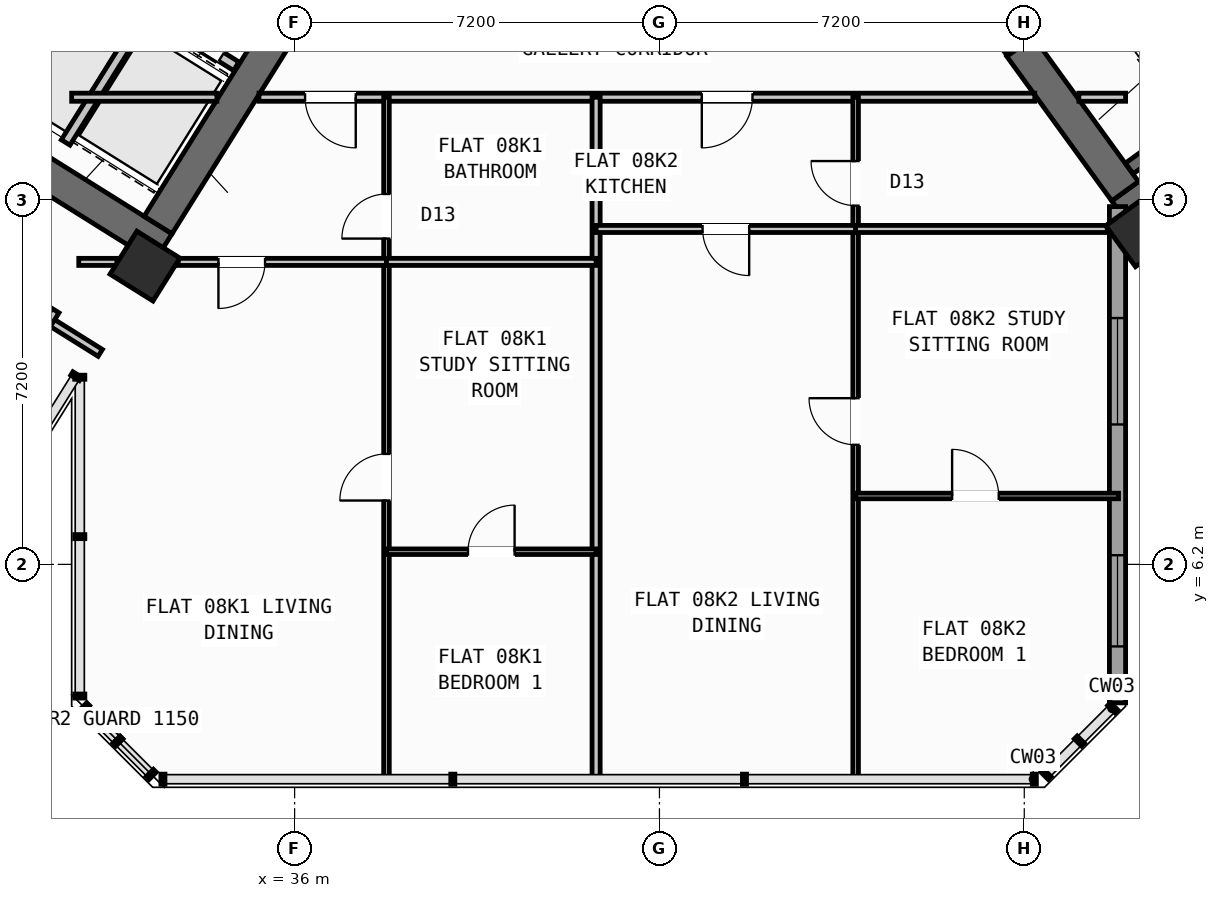
"""IFC4 building model, lengths in metres.
Left out: names, types, materials, properties, quantities, classifications, styles, units other than length and angle.
Written with IfcOpenShell. Run it as: python <this file> out.ifc"""

import sys

from ifc_helpers import new_model, si_unit, direction, frame, frame_2d, origin, origin_2d, place, context, subcontext, project, spatial, rectangle, hollow_rectangle, extrude, source, transform, mapped, element, fill, save


model = new_model("IFC4")
c1 = context("Model", 3, precision=1e-05, world=origin(), true_north=direction((0.0, 1.0)))
c2 = subcontext(c1, "Body", "Model", "MODEL_VIEW")
j1 = project(units=[si_unit("LENGTHUNIT", "METRE"), si_unit("PLANEANGLEUNIT", "RADIAN")], contexts=[c1])
p1 = place(None, origin())
s1 = spatial("IfcSite", under=j1, at=p1, CompositionType="ELEMENT")
p2 = place(p1, origin())
s2 = spatial("IfcBuilding", under=s1, at=p2, CompositionType="ELEMENT")
p3 = place(p2, frame((0.0, 0.0, 34.8)))
s3 = spatial("IfcBuildingStorey", under=s2, at=p3, CompositionType="ELEMENT", Elevation=34.8)
p4 = place(p3, frame((33.409, 12.45, 0.0), z_axis=(0.0, 0.0, 1.0), x_axis=(-0.848051132073, 0.529914405721, 0.0)))
e1 = element("IfcWall", 1, at=p4, inside=s3, PredefinedType="SHEAR", context=c2, shape_type="SweptSolid", body=[
    extrude(rectangle(XDim=13.24, YDim=0.65, at=frame_2d((6.62, 0.0))), origin(), (0.0, 0.0, 1.0), 3.35),
])
p5 = place(p3, frame((36.683, 18.304, 0.0), z_axis=(0.0, 0.0, 1.0), x_axis=(-0.529899109053, -0.848060690178, 0.0)))
e2 = element("IfcWall", 2, at=p5, inside=s3, PredefinedType="SHEAR", context=c2, shape_type="SweptSolid", body=[
    extrude(rectangle(XDim=6.375, YDim=0.65, at=frame_2d((3.188, 0.0))), origin(), (0.0, 0.0, 1.0), 3.35),
])
p6 = place(p3, frame((52.318, 13.11, 0.0), z_axis=(0.0, 0.0, 1.0), x_axis=(0.809019445368, 0.587781878776, 0.0)))
e3 = element("IfcWall", 3, at=p6, inside=s3, PredefinedType="SHEAR", context=c2, shape_type="SweptSolid", body=[
    extrude(rectangle(XDim=12.44, YDim=0.65, at=frame_2d((6.22, 0.0))), origin(), (0.0, 0.0, 1.0), 3.35),
])
p7 = place(p3, frame((52.39, 13.564, 0.0), z_axis=(0.0, 0.0, 1.0), x_axis=(-0.58779688989, 0.809008539037, 0.0)))
e4 = element("IfcWall", 4, at=p7, inside=s3, PredefinedType="SHEAR", context=c2, shape_type="SweptSolid", body=[
    extrude(rectangle(XDim=3.525, YDim=0.65, at=frame_2d((1.763, 0.0))), origin(), (0.0, 0.0, 1.0), 3.35),
])
m1 = source(origin(), c2, "Body", "SweptSolid", [
    extrude(hollow_rectangle(XDim=1.0, YDim=1.0, WallThickness=0.04, at=origin_2d()), origin(), (0.0, 0.0, 1.0), 3.6),
])
for number, where, z_axis, x_axis in (
    (5, (33.046, 12.087, 0.0), (0.0, 0.0, 1.0), (-0.848, 0.53, 0.0)),
    (6, (52.705, 12.773, 0.0), (0.0, 0.0, 1.0), (0.809, 0.588, 0.0)),
):
    element("IfcColumn", number, at=place(p3, frame(where, z_axis=z_axis, x_axis=x_axis)), inside=s3, PredefinedType="COLUMN", context=c2, shape_type="MappedRepresentation", body=[
        mapped(m1, transform((0.0, 0.0, 0.0), scale=1.0)),
    ])
p8 = place(p3, frame((56.581, 7.439, 0.0), z_axis=(0.0, 0.0, 1.0), x_axis=(-0.587785875463, 0.809016541614, 0.0)))
e7 = element("IfcWall", 7, at=p8, inside=s3, PredefinedType="STANDARD", context=c2, shape_type="SweptSolid", body=[
    extrude(rectangle(XDim=6.774, YDim=0.32, at=frame_2d((3.387, 0.0))), origin(), (0.0, 0.0, 1.0), 2.725),
])
p9 = place(p8, frame((1.556, 0.0, 0.8)))
e8 = element("IfcOpeningElement", 8, at=p9, cuts=e7, PredefinedType="OPENING", context=c2, shape_type="SweptSolid", body=[
    extrude(rectangle(XDim=2.1, YDim=1.55, at=frame_2d((1.05, 0.775))), frame((0.0, 0.17, 0.0), z_axis=(0.0, -1.0, 0.0), x_axis=(1.0, 0.0, 0.0)), (0.0, 0.0, 1.0), 0.34),
])
p10 = place(p3, frame((52.24, 13.261, 0.0), z_axis=(0.0, 0.0, 1.0), x_axis=(0.0, -1.0, 0.0)))
e9 = element("IfcWall", 9, at=p10, inside=s3, PredefinedType="STANDARD", context=c2, shape_type="SweptSolid", body=[
    extrude(rectangle(XDim=9.795, YDim=0.32, at=frame_2d((4.897, 0.0))), origin(), (0.0, 0.0, 1.0), 3.35),
])
p11 = place(p10, frame((2.199, 0.0, 0.8)))
e10 = element("IfcOpeningElement", 10, at=p11, cuts=e9, PredefinedType="OPENING", context=c2, shape_type="SweptSolid", body=[
    extrude(rectangle(XDim=2.1, YDim=1.55, at=frame_2d((1.05, 0.775))), frame((0.0, 0.17, 0.0), z_axis=(0.0, -1.0, 0.0), x_axis=(1.0, 0.0, 0.0)), (0.0, 0.0, 1.0), 0.34),
])
p12 = place(p10, frame((6.88, 0.0, 0.85)))
e11 = element("IfcOpeningElement", 11, at=p12, cuts=e9, PredefinedType="OPENING", context=c2, shape_type="SweptSolid", body=[
    extrude(rectangle(XDim=1.8, YDim=1.5, at=frame_2d((0.9, 0.75))), frame((0.0, 0.17, 0.0), z_axis=(0.0, -1.0, 0.0), x_axis=(1.0, 0.0, 0.0)), (0.0, 0.0, 1.0), 0.34),
])
p13 = place(p3, frame((31.288, 18.256, 0.0), z_axis=(0.0, 0.0, 1.0), x_axis=(-0.529943379326, -0.848033026897, 0.0)))
e12 = element("IfcWall", 12, at=p13, inside=s3, PredefinedType="SHEAR", context=c2, shape_type="SweptSolid", body=[
    extrude(rectangle(XDim=3.16, YDim=0.26, at=frame_2d((1.58, 0.0))), origin(), (0.0, 0.0, 1.0), 3.35),
])
p14 = place(p3, frame((34.848, 16.031, 0.0), z_axis=(0.0, 0.0, 1.0), x_axis=(-0.848044042236, 0.529925751807, 0.0)))
e13 = element("IfcWall", 13, at=p14, inside=s3, PredefinedType="STANDARD", context=c2, shape_type="SweptSolid", body=[
    extrude(rectangle(XDim=4.198, YDim=0.2, at=frame_2d((2.099, 0.0))), origin(), (0.0, 0.0, 1.0), 3.34),
])
p15 = place(p14, frame((0.348, 0.0, 0.0)))
e14 = element("IfcOpeningElement", 14, at=p15, cuts=e13, PredefinedType="OPENING", context=c2, shape_type="SweptSolid", body=[
    extrude(rectangle(XDim=1.3, YDim=2.2, at=frame_2d((0.65, 1.1))), frame((0.0, 0.11, 0.0), z_axis=(0.0, -1.0, 0.0), x_axis=(1.0, 0.0, 0.0)), (0.0, 0.0, 1.0), 0.22),
])
p16 = place(p14, frame((2.423, 0.0, 0.0)))
e15 = element("IfcOpeningElement", 15, at=p16, cuts=e13, PredefinedType="OPENING", context=c2, shape_type="SweptSolid", body=[
    extrude(rectangle(XDim=1.45, YDim=2.25, at=frame_2d((0.725, 1.125))), frame((0.0, 0.11, 0.0), z_axis=(0.0, -1.0, 0.0), x_axis=(1.0, 0.0, 0.0)), (0.0, 0.0, 1.0), 0.22),
])
p17 = place(p3, frame((33.029, 17.003, 0.0), z_axis=(0.0, 0.0, 1.0), x_axis=(-0.529916267533, -0.848049968695, 0.0)))
e16 = element("IfcWall", 16, at=p17, inside=s3, PredefinedType="STANDARD", context=c2, shape_type="SweptSolid", body=[
    extrude(rectangle(XDim=2.92, YDim=0.2, at=frame_2d((1.46, 0.0))), origin(), (0.0, 0.0, 1.0), 3.34),
])
p18 = place(p3, frame((52.472, 14.013, 0.0), z_axis=(0.0, 0.0, 1.0), x_axis=(0.809028366311, 0.587769599847, 0.0)))
e17 = element("IfcWall", 17, at=p18, inside=s3, PredefinedType="SHEAR", context=c2, shape_type="SweptSolid", body=[
    extrude(rectangle(XDim=7.33, YDim=0.26, at=frame_2d((3.665, 0.0))), origin(), (0.0, 0.0, 1.0), 3.35),
])
p19 = place(p3, frame((32.164, 10.374, 0.0), z_axis=(0.0, 0.0, 1.0), x_axis=(-0.848044107957, 0.529925646633, 0.0)))
e18 = element("IfcWall", 18, at=p19, inside=s3, PredefinedType="PARTITIONING", context=c2, shape_type="SweptSolid", body=[
    extrude(rectangle(XDim=15.57, YDim=0.16, at=frame_2d((7.785, 0.0))), origin(), (0.0, 0.0, 1.0), 3.34),
])
p20 = place(p19, frame((10.83, 0.0, 0.0)))
e19 = element("IfcOpeningElement", 19, at=p20, cuts=e18, PredefinedType="OPENING", context=c2, shape_type="SweptSolid", body=[
    extrude(rectangle(XDim=1.0, YDim=2.1, at=frame_2d((0.5, 1.05))), frame((0.0, 0.09, 0.0), z_axis=(0.0, -1.0, 0.0), x_axis=(1.0, 0.0, 0.0)), (0.0, 0.0, 1.0), 0.18),
])
p21 = place(p3, frame((31.282, 11.208, 0.0), z_axis=(0.0, 0.0, 1.0), x_axis=(-0.529938869374, -0.84803584519, 0.0)))
e20 = element("IfcWall", 20, at=p21, inside=s3, PredefinedType="PARTITIONING", context=c2, shape_type="SweptSolid", body=[
    extrude(rectangle(XDim=5.48, YDim=0.16, at=frame_2d((2.74, 0.0))), origin(), (0.0, 0.0, 1.0), 3.34),
])
p22 = place(p3, frame((31.6, 15.42, 0.0), z_axis=(0.0, 0.0, 1.0), x_axis=(1.0, 0.0, 0.0)))
e21 = element("IfcWall", 21, at=p22, inside=s3, PredefinedType="PARTITIONING", context=c2, shape_type="SweptSolid", body=[
    extrude(rectangle(XDim=2.866, YDim=0.16, at=frame_2d((1.433, 0.0))), origin(), (0.0, 0.0, 1.0), 3.34),
])
p23 = place(p3, frame((35.296, 15.42, 0.0), z_axis=(0.0, 0.0, 1.0), x_axis=(1.0, 0.0, 0.0)))
e22 = element("IfcWall", 22, at=p23, inside=s3, PredefinedType="PARTITIONING", context=c2, shape_type="SweptSolid", body=[
    extrude(rectangle(XDim=15.311, YDim=0.16, at=frame_2d((7.655, 0.0))), origin(), (0.0, 0.0, 1.0), 3.34),
])
p24 = place(p23, frame((0.91, 0.0, 0.0)))
e23 = element("IfcOpeningElement", 23, at=p24, cuts=e22, PredefinedType="OPENING", context=c2, shape_type="SweptSolid", body=[
    extrude(rectangle(XDim=1.0, YDim=2.1, at=frame_2d((0.5, 1.05))), frame((0.0, 0.09, 0.0), z_axis=(0.0, -1.0, 0.0), x_axis=(1.0, 0.0, 0.0)), (0.0, 0.0, 1.0), 0.18),
])
p25 = place(p23, frame((8.74, 0.0, 0.0)))
e24 = element("IfcOpeningElement", 24, at=p25, cuts=e22, PredefinedType="OPENING", context=c2, shape_type="SweptSolid", body=[
    extrude(rectangle(XDim=1.0, YDim=2.1, at=frame_2d((0.5, 1.05))), frame((0.0, 0.09, 0.0), z_axis=(0.0, -1.0, 0.0), x_axis=(1.0, 0.0, 0.0)), (0.0, 0.0, 1.0), 0.18),
])
p26 = place(p3, frame((51.477, 15.42, 0.0), z_axis=(0.0, 0.0, 1.0), x_axis=(1.0, 0.0, 0.0)))
e25 = element("IfcWall", 25, at=p26, inside=s3, PredefinedType="PARTITIONING", context=c2, shape_type="SweptSolid", body=[
    extrude(rectangle(XDim=0.923, YDim=0.16, at=frame_2d((0.461, 0.0))), origin(), (0.0, 0.0, 1.0), 3.34),
])
p27 = place(p3, frame((50.119, 16.333, 0.0), z_axis=(0.0, 0.0, 1.0), x_axis=(-0.587749856981, 0.809042709391, 0.0)))
e26 = element("IfcWall", 26, at=p27, inside=s3, PredefinedType="STANDARD", context=c2, shape_type="SweptSolid", body=[
    extrude(rectangle(XDim=2.96, YDim=0.2, at=frame_2d((1.48, 0.0))), origin(), (0.0, 0.0, 1.0), 3.34),
])
p28 = place(p27, frame((0.53, 0.0, 0.0)))
e27 = element("IfcOpeningElement", 27, at=p28, cuts=e26, PredefinedType="OPENING", context=c2, shape_type="SweptSolid", body=[
    extrude(rectangle(XDim=1.5, YDim=2.15, at=frame_2d((0.75, 1.075))), frame((0.0, 0.11, 0.0), z_axis=(0.0, -1.0, 0.0), x_axis=(1.0, 0.0, 0.0)), (0.0, 0.0, 1.0), 0.22),
])
p29 = place(p3, frame((41.95, 1.96, 0.0), z_axis=(0.0, 0.0, 1.0), x_axis=(0.0, 1.0, 0.0)))
e28 = element("IfcWall", 28, at=p29, inside=s3, PredefinedType="PARTITIONING", context=c2, shape_type="SweptSolid", body=[
    extrude(rectangle(XDim=13.46, YDim=0.16, at=frame_2d((6.73, 0.0))), origin(), (0.0, 0.0, 1.0), 3.34),
])
p30 = place(p3, frame((37.813, 1.96, 0.0), z_axis=(0.0, 0.0, 1.0), x_axis=(0.0, 1.0, 0.0)))
e29 = element("IfcWall", 29, at=p30, inside=s3, PredefinedType="PARTITIONING", context=c2, shape_type="SweptSolid", body=[
    extrude(rectangle(XDim=13.46, YDim=0.11, at=frame_2d((6.73, 0.0))), origin(), (0.0, 0.0, 1.0), 3.34),
])
p31 = place(p30, frame((5.5, 0.0, 0.0)))
e30 = element("IfcOpeningElement", 30, at=p31, cuts=e29, PredefinedType="OPENING", context=c2, shape_type="SweptSolid", body=[
    extrude(rectangle(XDim=0.92, YDim=2.08, at=frame_2d((0.46, 1.04))), frame((0.0, 0.065, 0.0), z_axis=(0.0, -1.0, 0.0), x_axis=(1.0, 0.0, 0.0)), (0.0, 0.0, 1.0), 0.13),
])
p32 = place(p30, frame((10.67, 0.0, 0.0)))
e31 = element("IfcOpeningElement", 31, at=p32, cuts=e29, PredefinedType="OPENING", context=c2, shape_type="SweptSolid", body=[
    extrude(rectangle(XDim=0.88, YDim=2.08, at=frame_2d((0.44, 1.04))), frame((0.0, 0.065, 0.0), z_axis=(0.0, -1.0, 0.0), x_axis=(1.0, 0.0, 0.0)), (0.0, 0.0, 1.0), 0.13),
])
p33 = place(p3, frame((31.74, 12.17, 0.0), z_axis=(0.0, 0.0, 1.0), x_axis=(1.0, 0.0, 0.0)))
e32 = element("IfcWall", 32, at=p33, inside=s3, PredefinedType="PLUMBINGWALL", context=c2, shape_type="SweptSolid", body=[
    extrude(rectangle(XDim=0.754, YDim=0.14, at=frame_2d((0.377, 0.0))), origin(), (0.0, 0.0, 1.0), 3.34),
])
p34 = place(p3, frame((33.702, 12.17, 0.0), z_axis=(0.0, 0.0, 1.0), x_axis=(1.0, 0.0, 0.0)))
e33 = element("IfcWall", 33, at=p34, inside=s3, PredefinedType="PLUMBINGWALL", context=c2, shape_type="SweptSolid", body=[
    extrude(rectangle(XDim=4.111, YDim=0.14, at=frame_2d((2.056, 0.0))), origin(), (0.0, 0.0, 1.0), 2.525),
])
p35 = place(p34, frame((0.795, 0.0, 0.0)))
e34 = element("IfcOpeningElement", 34, at=p35, cuts=e33, PredefinedType="OPENING", context=c2, shape_type="SweptSolid", body=[
    extrude(rectangle(XDim=0.92, YDim=2.08, at=frame_2d((0.46, 1.04))), frame((0.0, 0.08, 0.0), z_axis=(0.0, -1.0, 0.0), x_axis=(1.0, 0.0, 0.0)), (0.0, 0.0, 1.0), 0.16),
])
p36 = place(p3, frame((37.813, 12.17, 0.0), z_axis=(0.0, 0.0, 1.0), x_axis=(1.0, 0.0, 0.0)))
e35 = element("IfcWall", 35, at=p36, inside=s3, PredefinedType="PLUMBINGWALL", context=c2, shape_type="SweptSolid", body=[
    extrude(rectangle(XDim=4.137, YDim=0.14, at=frame_2d((2.068, 0.0))), origin(), (0.0, 0.0, 1.0), 2.525),
])
p37 = place(p3, frame((37.813, 6.45, 0.0), z_axis=(0.0, 0.0, 1.0), x_axis=(1.0, 0.0, 0.0)))
e36 = element("IfcWall", 36, at=p37, inside=s3, PredefinedType="PARTITIONING", context=c2, shape_type="SweptSolid", body=[
    extrude(rectangle(XDim=4.137, YDim=0.11, at=frame_2d((2.068, 0.0))), origin(), (0.0, 0.0, 1.0), 3.34),
])
p38 = place(p37, frame((1.608, 0.0, 0.0)))
e37 = element("IfcOpeningElement", 37, at=p38, cuts=e36, PredefinedType="OPENING", context=c2, shape_type="SweptSolid", body=[
    extrude(rectangle(XDim=0.92, YDim=2.08, at=frame_2d((0.46, 1.04))), frame((0.0, 0.065, 0.0), z_axis=(0.0, -1.0, 0.0), x_axis=(1.0, 0.0, 0.0)), (0.0, 0.0, 1.0), 0.13),
])
p39 = place(p3, frame((47.072, 1.96, 0.0), z_axis=(0.0, 0.0, 1.0), x_axis=(0.0, 1.0, 0.0)))
e38 = element("IfcWall", 38, at=p39, inside=s3, PredefinedType="PARTITIONING", context=c2, shape_type="SweptSolid", body=[
    extrude(rectangle(XDim=13.46, YDim=0.11, at=frame_2d((6.73, 0.0))), origin(), (0.0, 0.0, 1.0), 3.34),
])
p40 = place(p39, frame((6.6, 0.0, 0.0)))
e39 = element("IfcOpeningElement", 39, at=p40, cuts=e38, PredefinedType="OPENING", context=c2, shape_type="SweptSolid", body=[
    extrude(rectangle(XDim=0.92, YDim=2.08, at=frame_2d((0.46, 1.04))), frame((0.0, 0.065, 0.0), z_axis=(0.0, -1.0, 0.0), x_axis=(1.0, 0.0, 0.0)), (0.0, 0.0, 1.0), 0.13),
])
p41 = place(p39, frame((11.32, 0.0, 0.0)))
e40 = element("IfcOpeningElement", 40, at=p41, cuts=e38, PredefinedType="OPENING", context=c2, shape_type="SweptSolid", body=[
    extrude(rectangle(XDim=0.88, YDim=2.08, at=frame_2d((0.44, 1.04))), frame((0.0, 0.065, 0.0), z_axis=(0.0, -1.0, 0.0), x_axis=(1.0, 0.0, 0.0)), (0.0, 0.0, 1.0), 0.13),
])
p42 = place(p3, frame((41.95, 12.82, 0.0), z_axis=(0.0, 0.0, 1.0), x_axis=(1.0, 0.0, 0.0)))
e41 = element("IfcWall", 41, at=p42, inside=s3, PredefinedType="PLUMBINGWALL", context=c2, shape_type="SweptSolid", body=[
    extrude(rectangle(XDim=5.122, YDim=0.14, at=frame_2d((2.561, 0.0))), origin(), (0.0, 0.0, 1.0), 2.525),
])
p43 = place(p42, frame((2.101, 0.0, 0.0)))
e42 = element("IfcOpeningElement", 42, at=p43, cuts=e41, PredefinedType="OPENING", context=c2, shape_type="SweptSolid", body=[
    extrude(rectangle(XDim=0.92, YDim=2.08, at=frame_2d((0.46, 1.04))), frame((0.0, 0.08, 0.0), z_axis=(0.0, -1.0, 0.0), x_axis=(1.0, 0.0, 0.0)), (0.0, 0.0, 1.0), 0.16),
])
p44 = place(p3, frame((47.072, 12.82, 0.0), z_axis=(0.0, 0.0, 1.0), x_axis=(1.0, 0.0, 0.0)))
e43 = element("IfcWall", 43, at=p44, inside=s3, PredefinedType="PLUMBINGWALL", context=c2, shape_type="SweptSolid", body=[
    extrude(rectangle(XDim=4.967, YDim=0.14, at=frame_2d((2.483, 0.0))), origin(), (0.0, 0.0, 1.0), 2.525),
])
p45 = place(p3, frame((47.072, 7.55, 0.0), z_axis=(0.0, 0.0, 1.0), x_axis=(1.0, 0.0, 0.0)))
e44 = element("IfcWall", 44, at=p45, inside=s3, PredefinedType="PARTITIONING", context=c2, shape_type="SweptSolid", body=[
    extrude(rectangle(XDim=5.188, YDim=0.11, at=frame_2d((2.594, 0.0))), origin(), (0.0, 0.0, 1.0), 3.34),
])
p46 = place(p45, frame((1.904, 0.0, 0.0)))
e45 = element("IfcOpeningElement", 45, at=p46, cuts=e44, PredefinedType="OPENING", context=c2, shape_type="SweptSolid", body=[
    extrude(rectangle(XDim=0.92, YDim=2.08, at=frame_2d((0.46, 1.04))), frame((0.0, 0.065, 0.0), z_axis=(0.0, -1.0, 0.0), x_axis=(1.0, 0.0, 0.0)), (0.0, 0.0, 1.0), 0.13),
])
m2 = source(origin(), c2, "Body", "SweptSolid", [
    extrude(rectangle(XDim=2.1, YDim=1.55, at=frame_2d((1.05, 0.775))), frame((0.0, 0.03, 0.0), z_axis=(0.0, -1.0, 0.0), x_axis=(1.0, 0.0, 0.0)), (0.0, 0.0, 1.0), 0.06),
])
p47 = place(p11, origin())
e46 = element("IfcWindow", 46, at=p47, inside=s3, PartitioningType="SINGLE_PANEL", PredefinedType="WINDOW", context=c2, shape_type="MappedRepresentation", body=[
    mapped(m2, transform((0.0, 0.0, 0.0), scale=1.0)),
])
fill(e10, e46)
m3 = source(origin(), c2, "Body", "SweptSolid", [
    extrude(rectangle(XDim=1.8, YDim=1.5, at=frame_2d((0.9, 0.75))), frame((0.0, 0.03, 0.0), z_axis=(0.0, -1.0, 0.0), x_axis=(1.0, 0.0, 0.0)), (0.0, 0.0, 1.0), 0.06),
])
p48 = place(p12, origin())
e47 = element("IfcWindow", 47, at=p48, inside=s3, PartitioningType="SINGLE_PANEL", PredefinedType="WINDOW", context=c2, shape_type="MappedRepresentation", body=[
    mapped(m3, transform((0.0, 0.0, 0.0), scale=1.0)),
])
fill(e11, e47)
m4 = source(origin(), c2, "Body", "SweptSolid", [
    extrude(rectangle(XDim=1.3, YDim=2.2, at=frame_2d((0.65, 1.1))), frame((0.0, 0.025, 0.0), z_axis=(0.0, -1.0, 0.0), x_axis=(1.0, 0.0, 0.0)), (0.0, 0.0, 1.0), 0.05),
])
p49 = place(p15, origin())
e48 = element("IfcDoor", 48, at=p49, inside=s3, OperationType="DOUBLE_DOOR_SLIDING", PredefinedType="DOOR", context=c2, shape_type="MappedRepresentation", body=[
    mapped(m4, transform((0.0, 0.0, 0.0), scale=1.0)),
])
fill(e14, e48)
m5 = source(origin(), c2, "Body", "SweptSolid", [
    extrude(rectangle(XDim=0.92, YDim=2.08, at=frame_2d((0.46, 1.04))), frame((0.0, 0.025, 0.0), z_axis=(0.0, -1.0, 0.0), x_axis=(1.0, 0.0, 0.0)), (0.0, 0.0, 1.0), 0.05),
])
p50 = place(p31, origin())
e49 = element("IfcDoor", 49, at=p50, inside=s3, OperationType="SINGLE_SWING_LEFT", PredefinedType="DOOR", context=c2, shape_type="MappedRepresentation", body=[
    mapped(m5, transform((0.0, 0.0, 0.0), scale=1.0)),
])
fill(e30, e49)
p51 = place(p38, origin())
e50 = element("IfcDoor", 50, at=p51, inside=s3, OperationType="SINGLE_SWING_RIGHT", PredefinedType="DOOR", context=c2, shape_type="MappedRepresentation", body=[
    mapped(m5, transform((0.0, 0.0, 0.0), scale=1.0)),
])
fill(e37, e50)
m6 = source(origin(), c2, "Body", "SweptSolid", [
    extrude(rectangle(XDim=1.0, YDim=2.1, at=frame_2d((0.5, 1.05))), frame((0.0, 0.025, 0.0), z_axis=(0.0, -1.0, 0.0), x_axis=(1.0, 0.0, 0.0)), (0.0, 0.0, 1.0), 0.05),
])
p52 = place(p24, frame((1.0, 0.0, 0.0), z_axis=(0.0, 0.0, 1.0), x_axis=(-1.0, 0.0, 0.0)))
e51 = element("IfcDoor", 51, at=p52, inside=s3, OperationType="SINGLE_SWING_LEFT", PredefinedType="DOOR", context=c2, shape_type="MappedRepresentation", body=[
    mapped(m6, transform((0.0, 0.0, 0.0), scale=1.0)),
])
fill(e23, e51)
p53 = place(p35, frame((0.92, 0.0, 0.0), z_axis=(0.0, 0.0, 1.0), x_axis=(-1.0, 0.0, 0.0)))
e52 = element("IfcDoor", 52, at=p53, inside=s3, OperationType="SINGLE_SWING_RIGHT", PredefinedType="DOOR", context=c2, shape_type="MappedRepresentation", body=[
    mapped(m5, transform((0.0, 0.0, 0.0), scale=1.0)),
])
fill(e34, e52)
m7 = source(origin(), c2, "Body", "SweptSolid", [
    extrude(rectangle(XDim=0.88, YDim=2.08, at=frame_2d((0.44, 1.04))), frame((0.0, 0.025, 0.0), z_axis=(0.0, -1.0, 0.0), x_axis=(1.0, 0.0, 0.0)), (0.0, 0.0, 1.0), 0.05),
])
p54 = place(p32, origin())
e53 = element("IfcDoor", 53, at=p54, inside=s3, OperationType="SINGLE_SWING_LEFT", PredefinedType="DOOR", context=c2, shape_type="MappedRepresentation", body=[
    mapped(m7, transform((0.0, 0.0, 0.0), scale=1.0)),
])
fill(e31, e53)
p55 = place(p40, origin())
e54 = element("IfcDoor", 54, at=p55, inside=s3, OperationType="SINGLE_SWING_RIGHT", PredefinedType="DOOR", context=c2, shape_type="MappedRepresentation", body=[
    mapped(m5, transform((0.0, 0.0, 0.0), scale=1.0)),
])
fill(e39, e54)
p56 = place(p46, origin())
e55 = element("IfcDoor", 55, at=p56, inside=s3, OperationType="SINGLE_SWING_LEFT", PredefinedType="DOOR", context=c2, shape_type="MappedRepresentation", body=[
    mapped(m5, transform((0.0, 0.0, 0.0), scale=1.0)),
])
fill(e45, e55)
p57 = place(p25, frame((1.0, 0.0, 0.0), z_axis=(0.0, 0.0, 1.0), x_axis=(-1.0, 0.0, 0.0)))
e56 = element("IfcDoor", 56, at=p57, inside=s3, OperationType="SINGLE_SWING_RIGHT", PredefinedType="DOOR", context=c2, shape_type="MappedRepresentation", body=[
    mapped(m6, transform((0.0, 0.0, 0.0), scale=1.0)),
])
fill(e24, e56)
p58 = place(p43, frame((0.92, 0.0, 0.0), z_axis=(0.0, 0.0, 1.0), x_axis=(-1.0, 0.0, 0.0)))
e57 = element("IfcDoor", 57, at=p58, inside=s3, OperationType="SINGLE_SWING_LEFT", PredefinedType="DOOR", context=c2, shape_type="MappedRepresentation", body=[
    mapped(m5, transform((0.0, 0.0, 0.0), scale=1.0)),
])
fill(e42, e57)
p59 = place(p41, origin())
e58 = element("IfcDoor", 58, at=p59, inside=s3, OperationType="SINGLE_SWING_RIGHT", PredefinedType="DOOR", context=c2, shape_type="MappedRepresentation", body=[
    mapped(m7, transform((0.0, 0.0, 0.0), scale=1.0)),
])
fill(e40, e58)
save(model, sys.argv[1])
